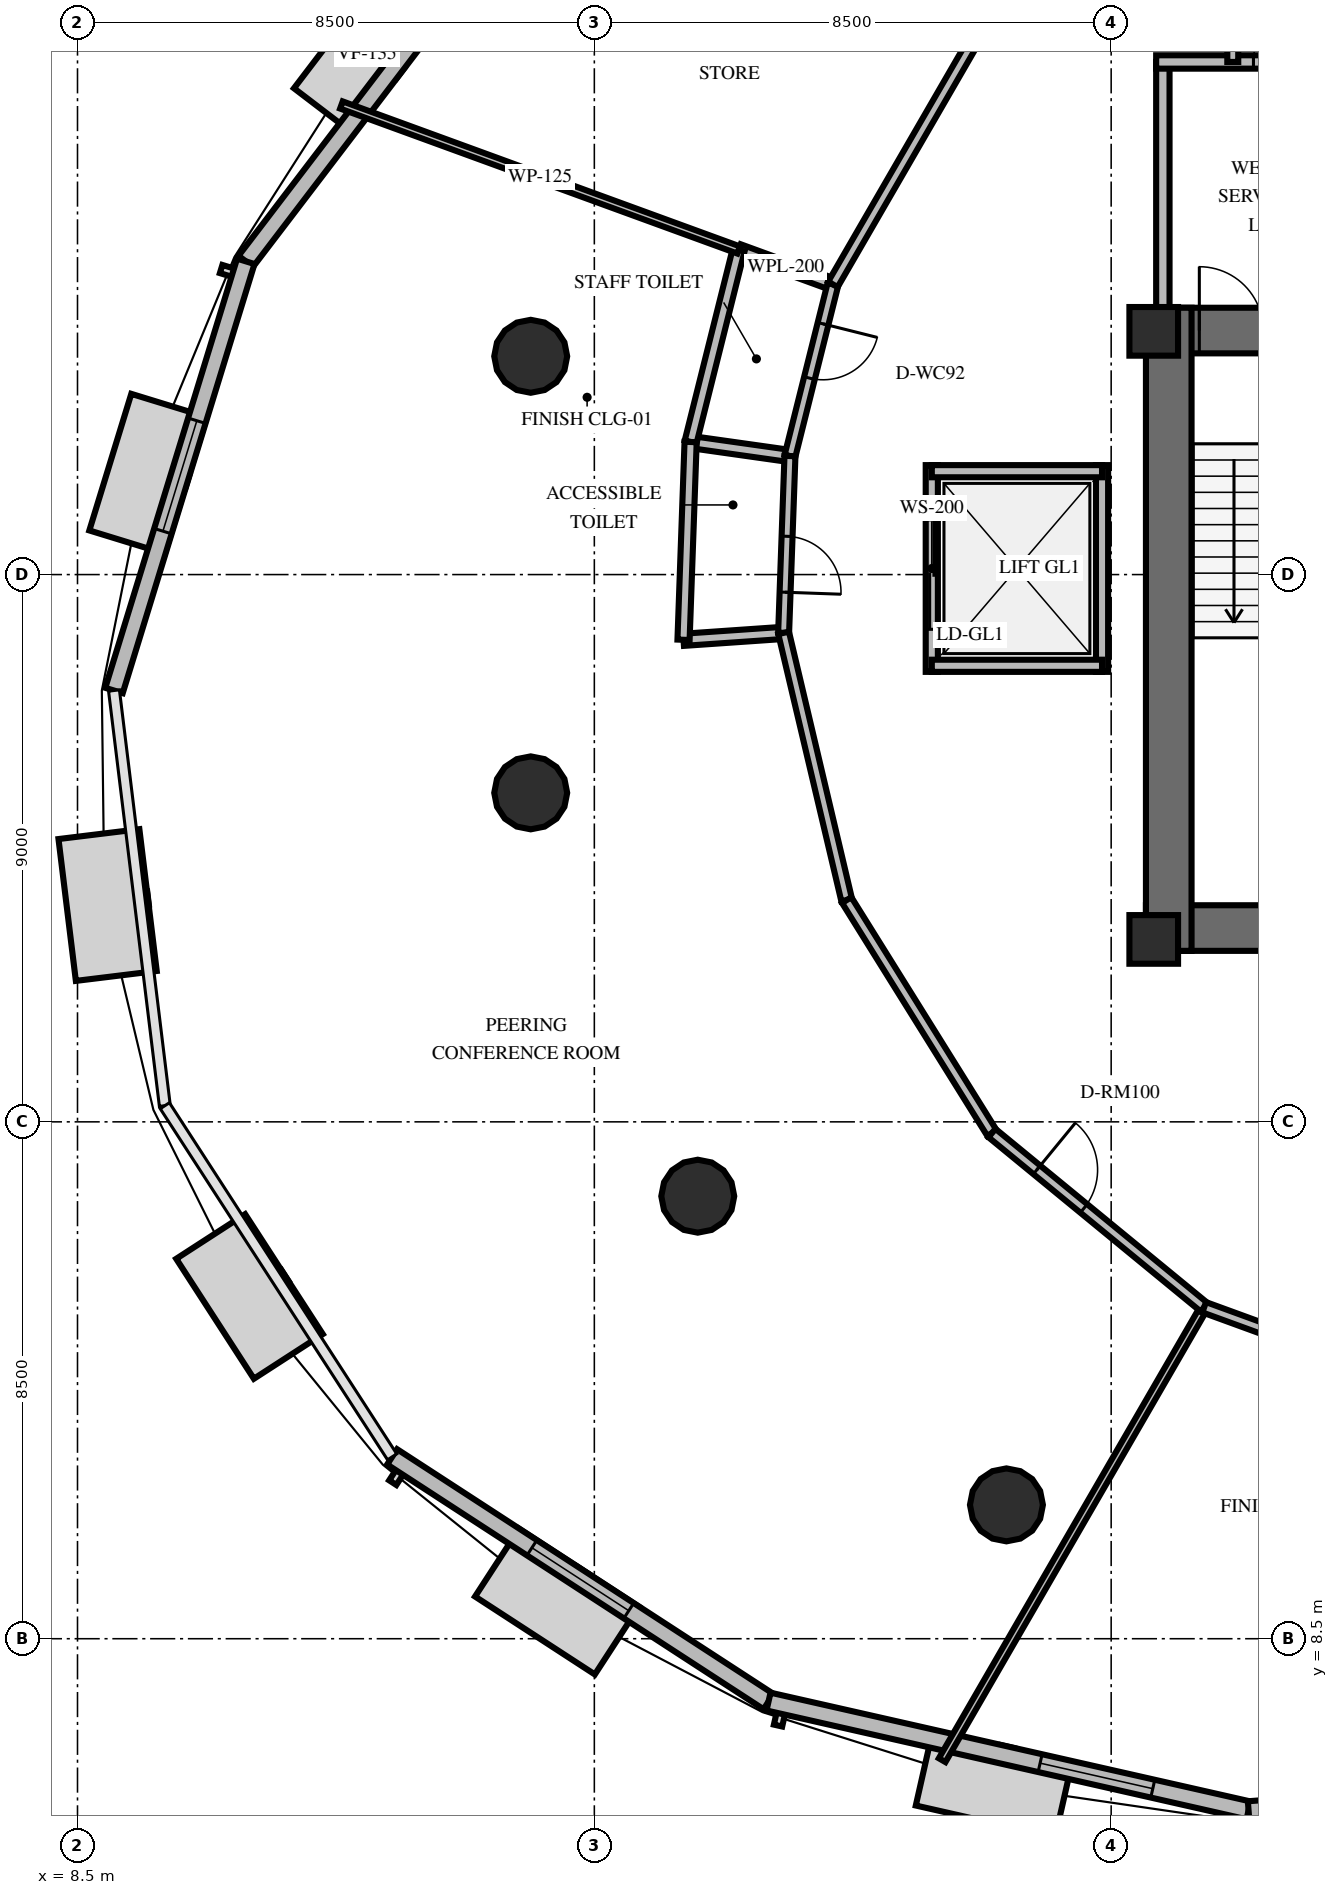
"""IFC4 building model, lengths in metres.
Left out: names, types, materials, properties, quantities, classifications, styles, units other than length and angle.
Written with IfcOpenShell. Run it as: python <this file> out.ifc"""

import sys

from ifc_helpers import new_model, si_unit, direction, frame, frame_2d, origin, origin_2d, place, context, subcontext, project, spatial, rectangle, circle, extrude, element, fill, save


model = new_model("IFC4")
c1 = context("Model", 3, precision=1e-05, world=origin(), true_north=direction((0.0, 1.0)))
c2 = subcontext(c1, "Body", "Model", "MODEL_VIEW")
j1 = project(units=[si_unit("LENGTHUNIT", "METRE"), si_unit("PLANEANGLEUNIT", "RADIAN")], contexts=[c1])
p1 = place(None, origin())
s1 = spatial("IfcSite", under=j1, at=p1, CompositionType="ELEMENT")
p2 = place(p1, origin())
s2 = spatial("IfcBuilding", under=s1, at=p2, CompositionType="ELEMENT")
p3 = place(p2, frame((0.0, 0.0, 117.8)))
s3 = spatial("IfcBuildingStorey", under=s2, at=p3, CompositionType="ELEMENT", Elevation=117.8)
p4 = place(p3, frame((26.072, 20.187, 0.0), z_axis=(0.0, 0.0, 1.0), x_axis=(1.0, 0.0, 0.0)))
e1 = element("IfcWall", 1, at=p4, inside=s3, PredefinedType="SHEAR", context=c2, shape_type="SweptSolid", body=[
    extrude(rectangle(XDim=15.866, YDim=0.75, at=frame_2d((7.933, 0.0))), origin(), (0.0, 0.0, 1.0), 4.0),
])
p5 = place(p3, frame((26.072, 30.013, 0.0), z_axis=(0.0, 0.0, 1.0), x_axis=(1.0, 0.0, 0.0)))
e2 = element("IfcWall", 2, at=p5, inside=s3, PredefinedType="SHEAR", context=c2, shape_type="SweptSolid", body=[
    extrude(rectangle(XDim=15.866, YDim=0.75, at=frame_2d((7.933, 0.0))), origin(), (0.0, 0.0, 1.0), 4.0),
])
p6 = place(p5, frame((0.878, 0.0, 0.0)))
e3 = element("IfcOpeningElement", 3, at=p6, cuts=e2, PredefinedType="OPENING", context=c2, shape_type="SweptSolid", body=[
    extrude(rectangle(XDim=1.05, YDim=2.15, at=frame_2d((0.525, 1.075))), frame((0.0, 0.385, 0.0), z_axis=(0.0, -1.0, 0.0), x_axis=(1.0, 0.0, 0.0)), (0.0, 0.0, 1.0), 0.77),
])
p7 = place(p5, frame((13.928, 0.0, 0.0)))
e4 = element("IfcOpeningElement", 4, at=p7, cuts=e2, PredefinedType="OPENING", context=c2, shape_type="SweptSolid", body=[
    extrude(rectangle(XDim=1.05, YDim=2.15, at=frame_2d((0.525, 1.075))), frame((0.0, 0.385, 0.0), z_axis=(0.0, -1.0, 0.0), x_axis=(1.0, 0.0, 0.0)), (0.0, 0.0, 1.0), 0.77),
])
p8 = place(p5, frame((7.378, 0.0, 0.0)))
e5 = element("IfcOpeningElement", 5, at=p8, cuts=e2, PredefinedType="OPENING", context=c2, shape_type="SweptSolid", body=[
    extrude(rectangle(XDim=1.1, YDim=2.15, at=frame_2d((0.55, 1.075))), frame((0.0, 0.385, 0.0), z_axis=(0.0, -1.0, 0.0), x_axis=(1.0, 0.0, 0.0)), (0.0, 0.0, 1.0), 0.77),
])
p9 = place(p3, frame((26.447, 19.812, 0.0), z_axis=(0.0, 0.0, 1.0), x_axis=(0.0, 1.0, 0.0)))
e6 = element("IfcWall", 6, at=p9, inside=s3, PredefinedType="SHEAR", context=c2, shape_type="SweptSolid", body=[
    extrude(rectangle(XDim=10.576, YDim=0.75, at=frame_2d((5.288, 0.0))), origin(), (0.0, 0.0, 1.0), 4.0),
])
for number, where, z_axis, x_axis in (
    (7, (26.2, 20.0, 0.0), (0.0, 0.0, 1.0), (1.0, 0.0, 0.0)),
    (8, (26.2, 30.0, 0.0), (0.0, 0.0, 1.0), (1.0, 0.0, 0.0)),
):
    element("IfcColumn", number, at=place(p3, frame(where, z_axis=z_axis, x_axis=x_axis)), inside=s3, PredefinedType="PILASTER", context=c2, shape_type="SweptSolid", body=[
        extrude(rectangle(XDim=0.8, YDim=0.8, at=origin_2d()), origin(), (0.0, 0.0, 1.0), 4.0),
    ])
for number, where, z_axis, x_axis in (
    (9, (15.954, 29.59, 0.0), (0.0, 0.0, 1.0), (1.0, 0.0, 0.0)),
    (10, (15.954, 22.41, 0.0), (0.0, 0.0, 1.0), (1.0, 0.0, 0.0)),
    (11, (18.701, 15.778, 0.0), (0.0, 0.0, 1.0), (1.0, 0.0, 0.0)),
    (12, (23.778, 10.701, 0.0), (0.0, 0.0, 1.0), (1.0, 0.0, 0.0)),
):
    element("IfcColumn", number, at=place(p3, frame(where, z_axis=z_axis, x_axis=x_axis)), inside=s3, PredefinedType="COLUMN", context=c2, shape_type="SweptSolid", body=[
        extrude(circle(Radius=0.6, at=origin_2d()), origin(), (0.0, 0.0, 1.0), 4.0),
    ])
p10 = place(p3, frame((16.177, 37.588, 0.0), z_axis=(0.0, 0.0, 1.0), x_axis=(-0.606432047851, -0.795135316371, 0.0)))
e13 = element("IfcWall", 13, at=p10, inside=s3, PredefinedType="SOLIDWALL", context=c2, shape_type="SweptSolid", body=[
    extrude(rectangle(XDim=8.095, YDim=0.3, at=frame_2d((4.048, 0.0))), origin(), (0.0, 0.0, 1.0), 2.9),
])
p11 = place(p10, frame((1.615, 0.0, 0.8)))
e14 = element("IfcOpeningElement", 14, at=p11, cuts=e13, PredefinedType="OPENING", context=c2, shape_type="SweptSolid", body=[
    extrude(rectangle(XDim=1.9, YDim=1.95, at=frame_2d((0.95, 0.975))), frame((0.0, 0.16, 0.0), z_axis=(0.0, -1.0, 0.0), x_axis=(1.0, 0.0, 0.0)), (0.0, 0.0, 1.0), 0.32),
])
p12 = place(p3, frame((11.267, 31.151, 0.0), z_axis=(0.0, 0.0, 1.0), x_axis=(-0.293539741082, -0.955946871121, 0.0)))
e15 = element("IfcWall", 15, at=p12, inside=s3, PredefinedType="SOLIDWALL", context=c2, shape_type="SweptSolid", body=[
    extrude(rectangle(XDim=7.383, YDim=0.3, at=frame_2d((3.691, 0.0))), origin(), (0.0, 0.0, 1.0), 2.9),
])
p13 = place(p12, frame((2.742, 0.0, 0.8)))
e16 = element("IfcOpeningElement", 16, at=p13, cuts=e15, PredefinedType="OPENING", context=c2, shape_type="SweptSolid", body=[
    extrude(rectangle(XDim=1.9, YDim=1.95, at=frame_2d((0.95, 0.975))), frame((0.0, 0.16, 0.0), z_axis=(0.0, -1.0, 0.0), x_axis=(1.0, 0.0, 0.0)), (0.0, 0.0, 1.0), 0.32),
])
p14 = place(p3, frame((13.675, 11.491, 0.0), z_axis=(0.0, 0.0, 1.0), x_axis=(0.838384683286, -0.545079006046, 0.0)))
e17 = element("IfcWall", 17, at=p14, inside=s3, PredefinedType="SOLIDWALL", context=c2, shape_type="SweptSolid", body=[
    extrude(rectangle(XDim=7.383, YDim=0.3, at=frame_2d((3.691, 0.0))), origin(), (0.0, 0.0, 1.0), 2.9),
])
p15 = place(p14, frame((2.742, 0.0, 0.8)))
e18 = element("IfcOpeningElement", 18, at=p15, cuts=e17, PredefinedType="OPENING", context=c2, shape_type="SweptSolid", body=[
    extrude(rectangle(XDim=1.9, YDim=1.95, at=frame_2d((0.95, 0.975))), frame((0.0, 0.16, 0.0), z_axis=(0.0, -1.0, 0.0), x_axis=(1.0, 0.0, 0.0)), (0.0, 0.0, 1.0), 0.32),
])
p16 = place(p3, frame((19.865, 7.466, 0.0), z_axis=(0.0, 0.0, 1.0), x_axis=(0.975266584043, -0.22103187564, 0.0)))
e19 = element("IfcWall", 19, at=p16, inside=s3, PredefinedType="SOLIDWALL", context=c2, shape_type="SweptSolid", body=[
    extrude(rectangle(XDim=8.095, YDim=0.3, at=frame_2d((4.048, 0.0))), origin(), (0.0, 0.0, 1.0), 2.9),
])
p17 = place(p16, frame((4.58, 0.0, 0.8)))
e20 = element("IfcOpeningElement", 20, at=p17, cuts=e19, PredefinedType="OPENING", context=c2, shape_type="SweptSolid", body=[
    extrude(rectangle(XDim=1.9, YDim=1.95, at=frame_2d((0.95, 0.975))), frame((0.0, 0.16, 0.0), z_axis=(0.0, -1.0, 0.0), x_axis=(1.0, 0.0, 0.0)), (0.0, 0.0, 1.0), 0.32),
])
p18 = place(p3, frame((27.76, 5.677, 0.0), z_axis=(0.0, 0.0, 1.0), x_axis=(0.997079436501, 0.076371443005, 0.0)))
e21 = element("IfcWall", 21, at=p18, inside=s3, PredefinedType="SOLIDWALL", context=c2, shape_type="SweptSolid", body=[
    extrude(rectangle(XDim=8.673, YDim=0.3, at=frame_2d((4.336, 0.0))), origin(), (0.0, 0.0, 1.0), 2.9),
])
p19 = place(p18, frame((3.386, 0.0, 0.8)))
e22 = element("IfcOpeningElement", 22, at=p19, cuts=e21, PredefinedType="OPENING", context=c2, shape_type="SweptSolid", body=[
    extrude(rectangle(XDim=1.9, YDim=1.95, at=frame_2d((0.95, 0.975))), frame((0.0, 0.16, 0.0), z_axis=(0.0, -1.0, 0.0), x_axis=(1.0, 0.0, 0.0)), (0.0, 0.0, 1.0), 0.32),
])
p20 = place(p3, frame((26.35, 30.05, 0.0), z_axis=(0.0, 0.0, 1.0), x_axis=(0.0, 1.0, 0.0)))
e23 = element("IfcWall", 23, at=p20, inside=s3, PredefinedType="SOLIDWALL", context=c2, shape_type="SweptSolid", body=[
    extrude(rectangle(XDim=4.38, YDim=0.22, at=frame_2d((2.19, 0.0))), origin(), (0.0, 0.0, 1.0), 2.8),
])
p21 = place(p3, frame((26.24, 34.43, 0.0), z_axis=(0.0, 0.0, 1.0), x_axis=(1.0, 0.0, 0.0)))
e24 = element("IfcWall", 24, at=p21, inside=s3, PredefinedType="SOLIDWALL", context=c2, shape_type="SweptSolid", body=[
    extrude(rectangle(XDim=4.31, YDim=0.22, at=frame_2d((2.155, 0.0))), origin(), (0.0, 0.0, 1.0), 2.8),
])
p22 = place(p21, frame((1.6, 0.0, 0.0)))
e25 = element("IfcOpeningElement", 25, at=p22, cuts=e24, PredefinedType="OPENING", context=c2, shape_type="SweptSolid", body=[
    extrude(rectangle(XDim=1.1, YDim=2.15, at=frame_2d((0.55, 1.075))), frame((0.0, 0.12, 0.0), z_axis=(0.0, -1.0, 0.0), x_axis=(1.0, 0.0, 0.0)), (0.0, 0.0, 1.0), 0.24),
])
p23 = place(p3, frame((22.55, 24.4, 0.0), z_axis=(0.0, 0.0, 1.0), x_axis=(0.0, 1.0, 0.0)))
e26 = element("IfcWall", 26, at=p23, inside=s3, PredefinedType="SOLIDWALL", context=c2, shape_type="SweptSolid", body=[
    extrude(rectangle(XDim=3.4, YDim=0.2, at=frame_2d((1.7, 0.0))), origin(), (0.0, 0.0, 1.0), 2.8),
])
p24 = place(p23, frame((0.7, 0.0, 0.0)))
e27 = element("IfcOpeningElement", 27, at=p24, cuts=e26, PredefinedType="OPENING", context=c2, shape_type="SweptSolid", body=[
    extrude(rectangle(XDim=1.8, YDim=2.4, at=frame_2d((0.9, 1.2))), frame((0.0, 0.11, 0.0), z_axis=(0.0, -1.0, 0.0), x_axis=(1.0, 0.0, 0.0)), (0.0, 0.0, 1.0), 0.22),
])
p25 = place(p3, frame((25.35, 24.4, 0.0), z_axis=(0.0, 0.0, 1.0), x_axis=(0.0, 1.0, 0.0)))
e28 = element("IfcWall", 28, at=p25, inside=s3, PredefinedType="SOLIDWALL", context=c2, shape_type="SweptSolid", body=[
    extrude(rectangle(XDim=3.4, YDim=0.2, at=frame_2d((1.7, 0.0))), origin(), (0.0, 0.0, 1.0), 2.8),
])
for number, where, z_axis, x_axis in (
    (29, (22.55, 24.5, 0.0), (0.0, 0.0, 1.0), (1.0, 0.0, 0.0)),
    (30, (22.55, 27.7, 0.0), (0.0, 0.0, 1.0), (1.0, 0.0, 0.0)),
):
    element("IfcWall", number, at=place(p3, frame(where, z_axis=z_axis, x_axis=x_axis)), inside=s3, PredefinedType="SOLIDWALL", context=c2, shape_type="SweptSolid", body=[
        extrude(rectangle(XDim=2.8, YDim=0.2, at=frame_2d((1.4, 0.0))), origin(), (0.0, 0.0, 1.0), 2.8),
    ])
p26 = place(p3, frame((27.5, 34.43, 0.0), z_axis=(0.0, 0.0, 1.0), x_axis=(0.0, 1.0, 0.0)))
e31 = element("IfcWall", 31, at=p26, inside=s3, PredefinedType="PARTITIONING", context=c2, shape_type="SweptSolid", body=[
    extrude(rectangle(XDim=1.693, YDim=0.18, at=frame_2d((0.846, 0.0))), origin(), (0.0, 0.0, 1.0), 2.8),
])
for number, where, z_axis, x_axis in (
    (32, (20.924, 30.772, 0.0), (0.0, 0.0, 1.0), (-0.939, 0.343, 0.0)),
    (33, (20.217, 27.949, 0.0), (0.0, 0.0, 1.0), (-0.99, 0.14, 0.0)),
):
    element("IfcWall", number, at=place(p3, frame(where, z_axis=z_axis, x_axis=x_axis)), inside=s3, PredefinedType="PLUMBINGWALL", context=c2, shape_type="SweptSolid", body=[
        extrude(rectangle(XDim=1.65, YDim=0.2, at=frame_2d((0.825, 0.0))), origin(), (0.0, 0.0, 1.0), 2.8),
    ])
p27 = place(p3, frame((19.374, 31.338, 0.0), z_axis=(0.0, 0.0, 1.0), x_axis=(-0.242729761631, -0.970093945357, 0.0)))
e34 = element("IfcWall", 34, at=p27, inside=s3, PredefinedType="PLUMBINGWALL", context=c2, shape_type="SweptSolid", body=[
    extrude(rectangle(XDim=3.255, YDim=0.2, at=frame_2d((1.627, 0.0))), origin(), (0.0, 0.0, 1.0), 2.8),
])
p28 = place(p3, frame((20.924, 30.772, 0.0), z_axis=(0.0, 0.0, 1.0), x_axis=(-0.242713284666, -0.970098067953, 0.0)))
e35 = element("IfcWall", 35, at=p28, inside=s3, PredefinedType="PARTITIONING", context=c2, shape_type="SweptSolid", body=[
    extrude(rectangle(XDim=2.91, YDim=0.18, at=frame_2d((1.455, 0.0))), origin(), (0.0, 0.0, 1.0), 2.8),
])
p29 = place(p28, frame((0.669, 0.0, 0.0)))
e36 = element("IfcOpeningElement", 36, at=p29, cuts=e35, PredefinedType="OPENING", context=c2, shape_type="SweptSolid", body=[
    extrude(rectangle(XDim=0.92, YDim=2.1, at=frame_2d((0.46, 1.05))), frame((0.0, 0.1, 0.0), z_axis=(0.0, -1.0, 0.0), x_axis=(1.0, 0.0, 0.0)), (0.0, 0.0, 1.0), 0.2),
])
p30 = place(p3, frame((20.113, 25.041, 0.0), z_axis=(0.0, 0.0, 1.0), x_axis=(-0.99762997818, -0.068807169958, 0.0)))
e37 = element("IfcWall", 37, at=p30, inside=s3, PredefinedType="PLUMBINGWALL", context=c2, shape_type="SweptSolid", body=[
    extrude(rectangle(XDim=1.65, YDim=0.2, at=frame_2d((0.825, 0.0))), origin(), (0.0, 0.0, 1.0), 2.8),
])
p31 = place(p3, frame((18.583, 28.18, 0.0), z_axis=(0.0, 0.0, 1.0), x_axis=(-0.035777140599, -0.999359793173, 0.0)))
e38 = element("IfcWall", 38, at=p31, inside=s3, PredefinedType="PLUMBINGWALL", context=c2, shape_type="SweptSolid", body=[
    extrude(rectangle(XDim=3.255, YDim=0.2, at=frame_2d((1.627, 0.0))), origin(), (0.0, 0.0, 1.0), 2.8),
])
p32 = place(p3, frame((20.217, 27.949, 0.0), z_axis=(0.0, 0.0, 1.0), x_axis=(-0.035823197379, -0.999358143275, 0.0)))
e39 = element("IfcWall", 39, at=p32, inside=s3, PredefinedType="PARTITIONING", context=c2, shape_type="SweptSolid", body=[
    extrude(rectangle(XDim=2.91, YDim=0.18, at=frame_2d((1.455, 0.0))), origin(), (0.0, 0.0, 1.0), 2.8),
])
p33 = place(p32, frame((1.321, 0.0, 0.0)))
e40 = element("IfcOpeningElement", 40, at=p33, cuts=e39, PredefinedType="OPENING", context=c2, shape_type="SweptSolid", body=[
    extrude(rectangle(XDim=0.92, YDim=2.1, at=frame_2d((0.46, 1.05))), frame((0.0, 0.1, 0.0), z_axis=(0.0, -1.0, 0.0), x_axis=(1.0, 0.0, 0.0)), (0.0, 0.0, 1.0), 0.2),
])
p34 = place(p3, frame((19.374, 31.338, 0.0), z_axis=(0.0, 0.0, 1.0), x_axis=(-0.939385857188, 0.342861796232, 0.0)))
e41 = element("IfcWall", 41, at=p34, inside=s3, PredefinedType="PARTITIONING", context=c2, shape_type="SweptSolid", body=[
    extrude(rectangle(XDim=6.955, YDim=0.125, at=frame_2d((3.478, 0.0))), origin(), (0.0, 0.0, 1.0), 2.8),
])
p35 = place(p3, frame((27.03, 13.951, 0.0), z_axis=(0.0, 0.0, 1.0), x_axis=(-0.500748808001, -0.86559264743, 0.0)))
e42 = element("IfcWall", 42, at=p35, inside=s3, PredefinedType="PARTITIONING", context=c2, shape_type="SweptSolid", body=[
    extrude(rectangle(XDim=8.605, YDim=0.125, at=frame_2d((4.302, 0.0))), origin(), (0.0, 0.0, 1.0), 2.8),
])
p36 = place(p3, frame((20.113, 25.041, 0.0), z_axis=(0.0, 0.0, 1.0), x_axis=(0.229765650993, -0.973245984129, 0.0)))
e43 = element("IfcWall", 43, at=p36, inside=s3, PredefinedType="PARTITIONING", context=c2, shape_type="SweptSolid", body=[
    extrude(rectangle(XDim=4.515, YDim=0.18, at=frame_2d((2.257, 0.0))), origin(), (0.0, 0.0, 1.0), 2.8),
])
p37 = place(p3, frame((21.15, 20.647, 0.0), z_axis=(0.0, 0.0, 1.0), x_axis=(0.529201601121, -0.848496119832, 0.0)))
e44 = element("IfcWall", 44, at=p37, inside=s3, PredefinedType="PARTITIONING", context=c2, shape_type="SweptSolid", body=[
    extrude(rectangle(XDim=4.515, YDim=0.18, at=frame_2d((2.258, 0.0))), origin(), (0.0, 0.0, 1.0), 2.8),
])
p38 = place(p3, frame((23.54, 16.816, 0.0), z_axis=(0.0, 0.0, 1.0), x_axis=(0.772898612526, -0.634529538127, 0.0)))
e45 = element("IfcWall", 45, at=p38, inside=s3, PredefinedType="PARTITIONING", context=c2, shape_type="SweptSolid", body=[
    extrude(rectangle(XDim=4.515, YDim=0.18, at=frame_2d((2.258, 0.0))), origin(), (0.0, 0.0, 1.0), 2.8),
])
p39 = place(p38, frame((0.954, 0.0, 0.0)))
e46 = element("IfcOpeningElement", 46, at=p39, cuts=e45, PredefinedType="OPENING", context=c2, shape_type="SweptSolid", body=[
    extrude(rectangle(XDim=1.0, YDim=2.15, at=frame_2d((0.5, 1.075))), frame((0.0, 0.1, 0.0), z_axis=(0.0, -1.0, 0.0), x_axis=(1.0, 0.0, 0.0)), (0.0, 0.0, 1.0), 0.2),
])
p40 = place(p3, frame((27.03, 13.951, 0.0), z_axis=(0.0, 0.0, 1.0), x_axis=(0.939403536329, -0.342813354368, 0.0)))
e47 = element("IfcWall", 47, at=p40, inside=s3, PredefinedType="PARTITIONING", context=c2, shape_type="SweptSolid", body=[
    extrude(rectangle(XDim=4.834, YDim=0.18, at=frame_2d((2.417, 0.0))), origin(), (0.0, 0.0, 1.0), 2.8),
])
p41 = place(p3, frame((23.344, 34.957, 0.0), z_axis=(0.0, 0.0, 1.0), x_axis=(-0.500765511673, -0.865582984074, 0.0)))
e48 = element("IfcWall", 48, at=p41, inside=s3, PredefinedType="PARTITIONING", context=c2, shape_type="SweptSolid", body=[
    extrude(rectangle(XDim=4.834, YDim=0.18, at=frame_2d((2.417, 0.0))), origin(), (0.0, 0.0, 1.0), 2.8),
])
p42 = place(p13, origin())
e49 = element("IfcWindow", 49, at=p42, inside=s3, PartitioningType="SINGLE_PANEL", PredefinedType="WINDOW", context=c2, shape_type="SweptSolid", body=[
    extrude(rectangle(XDim=1.9, YDim=1.95, at=frame_2d((0.95, 0.975))), frame((0.0, 0.03, 0.0), z_axis=(0.0, -1.0, 0.0), x_axis=(1.0, 0.0, 0.0)), (0.0, 0.0, 1.0), 0.06),
])
fill(e16, e49)
p43 = place(p15, origin())
e50 = element("IfcWindow", 50, at=p43, inside=s3, PartitioningType="SINGLE_PANEL", PredefinedType="WINDOW", context=c2, shape_type="SweptSolid", body=[
    extrude(rectangle(XDim=1.9, YDim=1.95, at=frame_2d((0.95, 0.975))), frame((0.0, 0.03, 0.0), z_axis=(0.0, -1.0, 0.0), x_axis=(1.0, 0.0, 0.0)), (0.0, 0.0, 1.0), 0.06),
])
fill(e18, e50)
p44 = place(p17, origin())
e51 = element("IfcWindow", 51, at=p44, inside=s3, PartitioningType="SINGLE_PANEL", PredefinedType="WINDOW", context=c2, shape_type="SweptSolid", body=[
    extrude(rectangle(XDim=1.9, YDim=1.95, at=frame_2d((0.95, 0.975))), frame((0.0, 0.03, 0.0), z_axis=(0.0, -1.0, 0.0), x_axis=(1.0, 0.0, 0.0)), (0.0, 0.0, 1.0), 0.06),
])
fill(e20, e51)
p45 = place(p6, origin())
e52 = element("IfcDoor", 52, at=p45, inside=s3, OperationType="SINGLE_SWING_LEFT", PredefinedType="DOOR", context=c2, shape_type="SweptSolid", body=[
    extrude(rectangle(XDim=1.05, YDim=2.15, at=frame_2d((0.525, 1.075))), frame((0.0, 0.025, 0.0), z_axis=(0.0, -1.0, 0.0), x_axis=(1.0, 0.0, 0.0)), (0.0, 0.0, 1.0), 0.05),
])
fill(e3, e52)
p46 = place(p22, origin())
e53 = element("IfcDoor", 53, at=p46, inside=s3, OperationType="SINGLE_SWING_RIGHT", PredefinedType="DOOR", context=c2, shape_type="SweptSolid", body=[
    extrude(rectangle(XDim=1.1, YDim=2.15, at=frame_2d((0.55, 1.075))), frame((0.0, 0.025, 0.0), z_axis=(0.0, -1.0, 0.0), x_axis=(1.0, 0.0, 0.0)), (0.0, 0.0, 1.0), 0.05),
])
fill(e25, e53)
p47 = place(p24, origin())
e54 = element("IfcDoor", 54, at=p47, inside=s3, OperationType="DOUBLE_DOOR_SLIDING", PredefinedType="USERDEFINED", context=c2, shape_type="SweptSolid", body=[
    extrude(rectangle(XDim=1.8, YDim=2.4, at=frame_2d((0.9, 1.2))), frame((0.0, 0.025, 0.0), z_axis=(0.0, -1.0, 0.0), x_axis=(1.0, 0.0, 0.0)), (0.0, 0.0, 1.0), 0.05),
])
fill(e27, e54)
p48 = place(p29, origin())
e55 = element("IfcDoor", 55, at=p48, inside=s3, OperationType="SINGLE_SWING_LEFT", PredefinedType="DOOR", context=c2, shape_type="SweptSolid", body=[
    extrude(rectangle(XDim=0.92, YDim=2.1, at=frame_2d((0.46, 1.05))), frame((0.0, 0.025, 0.0), z_axis=(0.0, -1.0, 0.0), x_axis=(1.0, 0.0, 0.0)), (0.0, 0.0, 1.0), 0.05),
])
fill(e36, e55)
p49 = place(p33, origin())
e56 = element("IfcDoor", 56, at=p49, inside=s3, OperationType="SINGLE_SWING_RIGHT", PredefinedType="DOOR", context=c2, shape_type="SweptSolid", body=[
    extrude(rectangle(XDim=0.92, YDim=2.1, at=frame_2d((0.46, 1.05))), frame((0.0, 0.025, 0.0), z_axis=(0.0, -1.0, 0.0), x_axis=(1.0, 0.0, 0.0)), (0.0, 0.0, 1.0), 0.05),
])
fill(e40, e56)
p50 = place(p39, origin())
e57 = element("IfcDoor", 57, at=p50, inside=s3, OperationType="SINGLE_SWING_LEFT", PredefinedType="DOOR", context=c2, shape_type="SweptSolid", body=[
    extrude(rectangle(XDim=1.0, YDim=2.15, at=frame_2d((0.5, 1.075))), frame((0.0, 0.025, 0.0), z_axis=(0.0, -1.0, 0.0), x_axis=(1.0, 0.0, 0.0)), (0.0, 0.0, 1.0), 0.05),
])
fill(e46, e57)
save(model, sys.argv[1])
